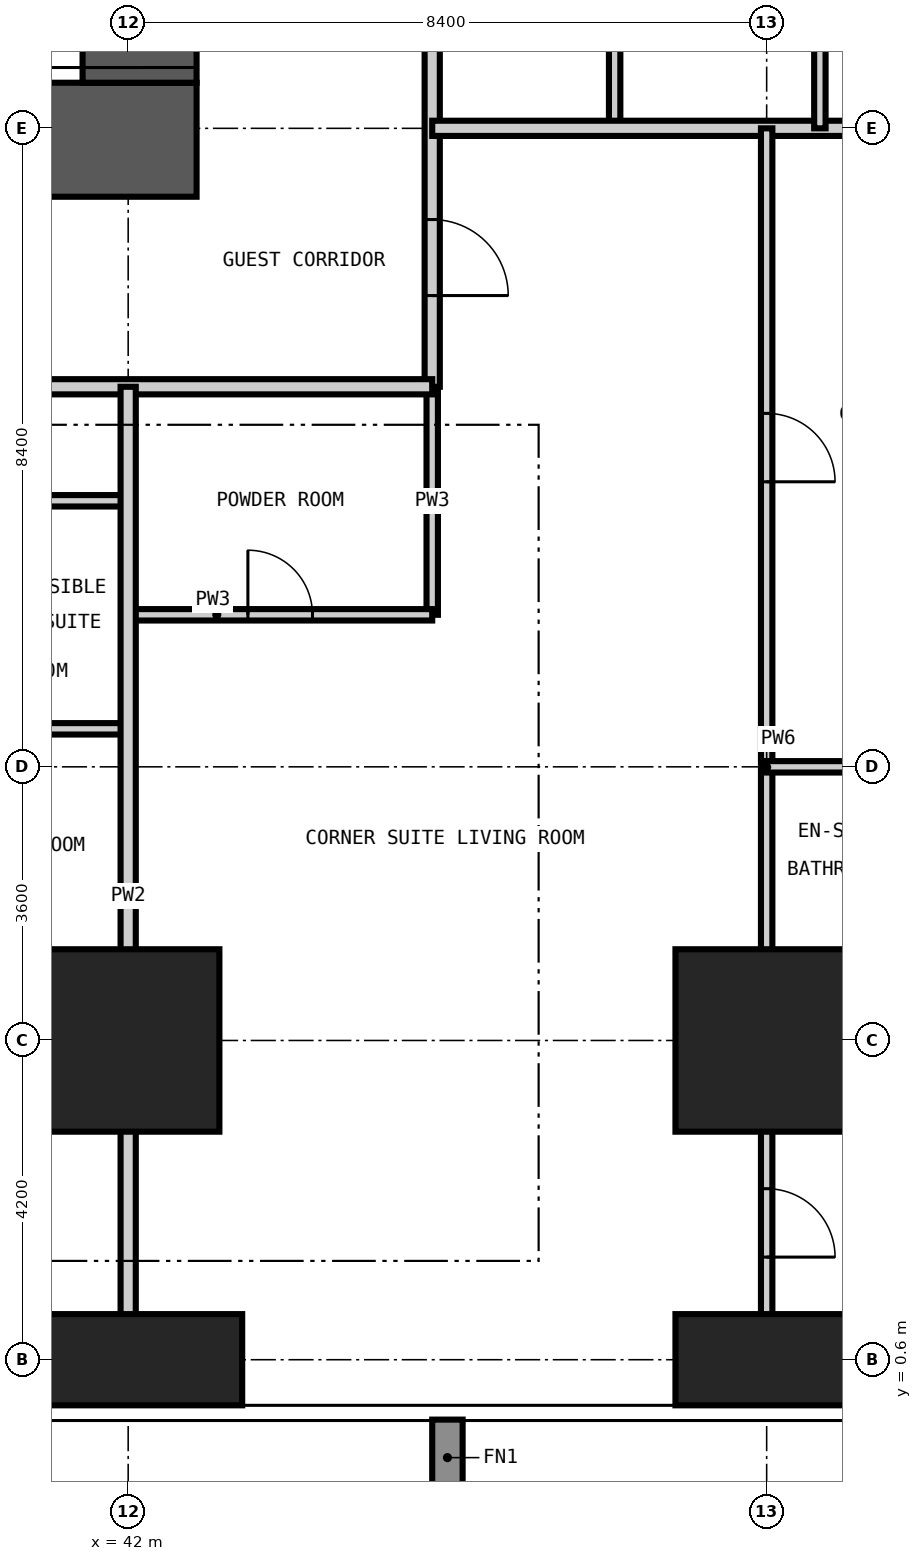
"""IFC4 building model, lengths in metres.
Left out: names, types, materials, properties, quantities, classifications, styles, units other than length and angle.
Written with IfcOpenShell. Run it as: python <this file> out.ifc"""

import sys

from ifc_helpers import new_model, si_unit, direction, frame, frame_2d, origin, origin_2d, place, context, subcontext, project, spatial, rectangle, extrude, element, fill, save


model = new_model("IFC4")
c1 = context("Model", 3, precision=1e-05, world=origin(), true_north=direction((0.0, 1.0)))
c2 = subcontext(c1, "Body", "Model", "MODEL_VIEW")
j1 = project(units=[si_unit("LENGTHUNIT", "METRE"), si_unit("PLANEANGLEUNIT", "RADIAN")], contexts=[c1])
p1 = place(None, origin())
s1 = spatial("IfcSite", under=j1, at=p1, CompositionType="ELEMENT")
p2 = place(p1, origin())
s2 = spatial("IfcBuilding", under=s1, at=p2, CompositionType="ELEMENT")
p3 = place(p2, frame((0.0, 0.0, 84.6)))
s3 = spatial("IfcBuildingStorey", under=s2, at=p3, CompositionType="ELEMENT", Elevation=84.6)
p4 = place(p3, frame((42.0, 0.6, -0.35), z_axis=(0.0, 0.0, 1.0), x_axis=(1.0, 0.0, 0.0)))
e1 = element("IfcColumn", 1, at=p4, inside=s3, PredefinedType="COLUMN", context=c2, shape_type="SweptSolid", body=[
    extrude(rectangle(XDim=3.0, YDim=1.2, at=origin_2d()), origin(), (0.0, 0.0, 1.0), 3.55),
])
p5 = place(p3, frame((42.0, 4.8, -0.35), z_axis=(0.0, 0.0, 1.0), x_axis=(1.0, 0.0, 0.0)))
e2 = element("IfcColumn", 2, at=p5, inside=s3, PredefinedType="COLUMN", context=c2, shape_type="SweptSolid", body=[
    extrude(rectangle(XDim=2.4, YDim=2.4, at=origin_2d()), origin(), (0.0, 0.0, 1.0), 3.55),
])
p6 = place(p3, frame((50.4, 0.6, -0.35), z_axis=(0.0, 0.0, 1.0), x_axis=(1.0, 0.0, 0.0)))
e3 = element("IfcColumn", 3, at=p6, inside=s3, PredefinedType="COLUMN", context=c2, shape_type="SweptSolid", body=[
    extrude(rectangle(XDim=2.4, YDim=1.2, at=origin_2d()), origin(), (0.0, 0.0, 1.0), 3.55),
])
p7 = place(p3, frame((50.4, 4.8, -0.35), z_axis=(0.0, 0.0, 1.0), x_axis=(1.0, 0.0, 0.0)))
e4 = element("IfcColumn", 4, at=p7, inside=s3, PredefinedType="COLUMN", context=c2, shape_type="SweptSolid", body=[
    extrude(rectangle(XDim=2.4, YDim=2.4, at=origin_2d()), origin(), (0.0, 0.0, 1.0), 3.55),
])
p8 = place(p3, frame((15.9, 16.65, -0.35), z_axis=(0.0, 0.0, 1.0), x_axis=(1.0, 0.0, 0.0)))
e5 = element("IfcWall", 5, at=p8, inside=s3, PredefinedType="SHEAR", context=c2, shape_type="SweptSolid", body=[
    extrude(rectangle(XDim=27.0, YDim=1.5, at=frame_2d((13.5, 0.0))), origin(), (0.0, 0.0, 1.0), 3.55),
])
p9 = place(p8, frame((13.0, 0.0, 0.35)))
e6 = element("IfcOpeningElement", 6, at=p9, cuts=e5, PredefinedType="OPENING", context=c2, shape_type="SweptSolid", body=[
    extrude(rectangle(XDim=1.0, YDim=2.1, at=frame_2d((0.5, 1.05))), frame((0.0, 0.76, 0.0), z_axis=(0.0, -1.0, 0.0), x_axis=(1.0, 0.0, 0.0)), (0.0, 0.0, 1.0), 1.52),
])
p10 = place(p8, frame((19.3, 0.0, 0.35)))
e7 = element("IfcOpeningElement", 7, at=p10, cuts=e5, PredefinedType="OPENING", context=c2, shape_type="SweptSolid", body=[
    extrude(rectangle(XDim=1.0, YDim=2.1, at=frame_2d((0.5, 1.05))), frame((0.0, 0.76, 0.0), z_axis=(0.0, -1.0, 0.0), x_axis=(1.0, 0.0, 0.0)), (0.0, 0.0, 1.0), 1.52),
])
p11 = place(p3, frame((42.15, 17.4, -0.35), z_axis=(0.0, 0.0, 1.0), x_axis=(0.0, 1.0, 0.0)))
e8 = element("IfcWall", 8, at=p11, inside=s3, PredefinedType="SHEAR", context=c2, shape_type="SweptSolid", body=[
    extrude(rectangle(XDim=24.0, YDim=1.5, at=frame_2d((12.0, 0.0))), origin(), (0.0, 0.0, 1.0), 3.55),
])
p12 = place(p11, frame((0.2, 0.0, 0.35)))
e9 = element("IfcOpeningElement", 9, at=p12, cuts=e8, PredefinedType="OPENING", context=c2, shape_type="SweptSolid", body=[
    extrude(rectangle(XDim=1.2, YDim=2.2, at=frame_2d((0.6, 1.1))), frame((0.0, 0.76, 0.0), z_axis=(0.0, -1.0, 0.0), x_axis=(1.0, 0.0, 0.0)), (0.0, 0.0, 1.0), 1.52),
])
p13 = place(p11, frame((11.5, 0.0, 0.35)))
e10 = element("IfcOpeningElement", 10, at=p13, cuts=e8, PredefinedType="OPENING", context=c2, shape_type="SweptSolid", body=[
    extrude(rectangle(XDim=1.0, YDim=2.1, at=frame_2d((0.5, 1.05))), frame((0.0, 0.76, 0.0), z_axis=(0.0, -1.0, 0.0), x_axis=(1.0, 0.0, 0.0)), (0.0, 0.0, 1.0), 1.52),
])
p14 = place(p11, frame((19.9, 0.0, 0.35)))
e11 = element("IfcOpeningElement", 11, at=p14, cuts=e8, PredefinedType="OPENING", context=c2, shape_type="SweptSolid", body=[
    extrude(rectangle(XDim=1.0, YDim=2.1, at=frame_2d((0.5, 1.05))), frame((0.0, 0.76, 0.0), z_axis=(0.0, -1.0, 0.0), x_axis=(1.0, 0.0, 0.0)), (0.0, 0.0, 1.0), 1.52),
])
p15 = place(p3, frame((46.0, 10.4, 0.0), z_axis=(0.0, 0.0, 1.0), x_axis=(0.0, 1.0, 0.0)))
e12 = element("IfcWall", 12, at=p15, inside=s3, PredefinedType="PARTITIONING", context=c2, shape_type="SweptSolid", body=[
    extrude(rectangle(XDim=3.0, YDim=0.15, at=frame_2d((1.5, 0.0))), origin(), (0.0, 0.0, 1.0), 3.2),
])
p16 = place(p3, frame((48.4, 16.8, 0.0), z_axis=(0.0, 0.0, 1.0), x_axis=(0.0, 1.0, 0.0)))
e13 = element("IfcWall", 13, at=p16, inside=s3, PredefinedType="PARTITIONING", context=c2, shape_type="SweptSolid", body=[
    extrude(rectangle(XDim=2.7, YDim=0.15, at=frame_2d((1.35, 0.0))), origin(), (0.0, 0.0, 1.0), 3.2),
])
p17 = place(p3, frame((50.4, 4.8, 0.0), z_axis=(0.0, 0.0, 1.0), x_axis=(1.0, 0.0, 0.0)))
e14 = element("IfcWall", 14, at=p17, inside=s3, PredefinedType="PARTITIONING", context=c2, shape_type="SweptSolid", body=[
    extrude(rectangle(XDim=3.0, YDim=0.15, at=frame_2d((1.5, 0.0))), origin(), (0.0, 0.0, 1.0), 3.2),
])
p18 = place(p3, frame((39.3, 8.9, 0.0), z_axis=(0.0, 0.0, 1.0), x_axis=(1.0, 0.0, 0.0)))
e15 = element("IfcWall", 15, at=p18, inside=s3, PredefinedType="PARTITIONING", context=c2, shape_type="SweptSolid", body=[
    extrude(rectangle(XDim=2.7, YDim=0.15, at=frame_2d((1.35, 0.0))), origin(), (0.0, 0.0, 1.0), 3.2),
])
p19 = place(p3, frame((42.0, 10.4, 0.0), z_axis=(0.0, 0.0, 1.0), x_axis=(1.0, 0.0, 0.0)))
e16 = element("IfcWall", 16, at=p19, inside=s3, PredefinedType="PARTITIONING", context=c2, shape_type="SweptSolid", body=[
    extrude(rectangle(XDim=4.0, YDim=0.15, at=frame_2d((2.0, 0.0))), origin(), (0.0, 0.0, 1.0), 3.2),
])
p20 = place(p19, frame((1.575, 0.0, 0.0)))
e17 = element("IfcOpeningElement", 17, at=p20, cuts=e16, PredefinedType="OPENING", context=c2, shape_type="SweptSolid", body=[
    extrude(rectangle(XDim=0.85, YDim=2.1, at=frame_2d((0.425, 1.05))), frame((0.0, 0.085, 0.0), z_axis=(0.0, -1.0, 0.0), x_axis=(1.0, 0.0, 0.0)), (0.0, 0.0, 1.0), 0.17),
])
p21 = place(p3, frame((39.3, 11.9, 0.0), z_axis=(0.0, 0.0, 1.0), x_axis=(1.0, 0.0, 0.0)))
e18 = element("IfcWall", 18, at=p21, inside=s3, PredefinedType="PARTITIONING", context=c2, shape_type="SweptSolid", body=[
    extrude(rectangle(XDim=2.7, YDim=0.15, at=frame_2d((1.35, 0.0))), origin(), (0.0, 0.0, 1.0), 3.2),
])
p22 = place(p3, frame((46.0, 44.8, 0.0), z_axis=(0.0, 0.0, 1.0), x_axis=(0.0, -1.0, 0.0)))
e19 = element("IfcWall", 19, at=p22, inside=s3, PredefinedType="PARTITIONING", context=c2, shape_type="SweptSolid", body=[
    extrude(rectangle(XDim=31.4, YDim=0.2, at=frame_2d((15.7, 0.0))), origin(), (0.0, 0.0, 1.0), 3.2),
])
p23 = place(p22, frame((21.2, 0.0, 0.0)))
e20 = element("IfcOpeningElement", 20, at=p23, cuts=e19, PredefinedType="OPENING", context=c2, shape_type="SweptSolid", body=[
    extrude(rectangle(XDim=1.0, YDim=2.2, at=frame_2d((0.5, 1.1))), frame((0.0, 0.11, 0.0), z_axis=(0.0, -1.0, 0.0), x_axis=(1.0, 0.0, 0.0)), (0.0, 0.0, 1.0), 0.22),
])
p24 = place(p22, frame((8.6, 0.0, 0.0)))
e21 = element("IfcOpeningElement", 21, at=p24, cuts=e19, PredefinedType="OPENING", context=c2, shape_type="SweptSolid", body=[
    extrude(rectangle(XDim=1.0, YDim=2.2, at=frame_2d((0.5, 1.1))), frame((0.0, 0.11, 0.0), z_axis=(0.0, -1.0, 0.0), x_axis=(1.0, 0.0, 0.0)), (0.0, 0.0, 1.0), 0.22),
])
p25 = place(p22, frame((29.2, 0.0, 0.0)))
e22 = element("IfcOpeningElement", 22, at=p25, cuts=e19, PredefinedType="OPENING", context=c2, shape_type="SweptSolid", body=[
    extrude(rectangle(XDim=1.0, YDim=2.2, at=frame_2d((0.5, 1.1))), frame((0.0, 0.11, 0.0), z_axis=(0.0, -1.0, 0.0), x_axis=(1.0, 0.0, 0.0)), (0.0, 0.0, 1.0), 0.22),
])
p26 = place(p22, frame((0.9, 0.0, 0.0)))
e23 = element("IfcOpeningElement", 23, at=p26, cuts=e19, PredefinedType="OPENING", context=c2, shape_type="SweptSolid", body=[
    extrude(rectangle(XDim=1.0, YDim=2.2, at=frame_2d((0.5, 1.1))), frame((0.0, 0.11, 0.0), z_axis=(0.0, -1.0, 0.0), x_axis=(1.0, 0.0, 0.0)), (0.0, 0.0, 1.0), 0.22),
])
p27 = place(p3, frame((46.0, 13.4, 0.0), z_axis=(0.0, 0.0, 1.0), x_axis=(-1.0, 0.0, 0.0)))
e24 = element("IfcWall", 24, at=p27, inside=s3, PredefinedType="PARTITIONING", context=c2, shape_type="SweptSolid", body=[
    extrude(rectangle(XDim=32.6, YDim=0.2, at=frame_2d((16.3, 0.0))), origin(), (0.0, 0.0, 1.0), 3.2),
])
p28 = place(p27, frame((26.6, 0.0, 0.0)))
e25 = element("IfcOpeningElement", 25, at=p28, cuts=e24, PredefinedType="OPENING", context=c2, shape_type="SweptSolid", body=[
    extrude(rectangle(XDim=1.0, YDim=2.2, at=frame_2d((0.5, 1.1))), frame((0.0, 0.11, 0.0), z_axis=(0.0, -1.0, 0.0), x_axis=(1.0, 0.0, 0.0)), (0.0, 0.0, 1.0), 0.22),
])
p29 = place(p27, frame((19.1, 0.0, 0.0)))
e26 = element("IfcOpeningElement", 26, at=p29, cuts=e24, PredefinedType="OPENING", context=c2, shape_type="SweptSolid", body=[
    extrude(rectangle(XDim=1.0, YDim=2.2, at=frame_2d((0.5, 1.1))), frame((0.0, 0.11, 0.0), z_axis=(0.0, -1.0, 0.0), x_axis=(1.0, 0.0, 0.0)), (0.0, 0.0, 1.0), 0.22),
])
p30 = place(p27, frame((13.1, 0.0, 0.0)))
e27 = element("IfcOpeningElement", 27, at=p30, cuts=e24, PredefinedType="OPENING", context=c2, shape_type="SweptSolid", body=[
    extrude(rectangle(XDim=1.0, YDim=2.2, at=frame_2d((0.5, 1.1))), frame((0.0, 0.11, 0.0), z_axis=(0.0, -1.0, 0.0), x_axis=(1.0, 0.0, 0.0)), (0.0, 0.0, 1.0), 0.22),
])
p31 = place(p27, frame((5.6, 0.0, 0.0)))
e28 = element("IfcOpeningElement", 28, at=p31, cuts=e24, PredefinedType="OPENING", context=c2, shape_type="SweptSolid", body=[
    extrude(rectangle(XDim=1.0, YDim=2.2, at=frame_2d((0.5, 1.1))), frame((0.0, 0.11, 0.0), z_axis=(0.0, -1.0, 0.0), x_axis=(1.0, 0.0, 0.0)), (0.0, 0.0, 1.0), 0.22),
])
p32 = place(p3, frame((42.0, -0.008, 0.0), z_axis=(0.0, 0.0, 1.0), x_axis=(0.0, 1.0, 0.0)))
e29 = element("IfcWall", 29, at=p32, inside=s3, PredefinedType="PARTITIONING", context=c2, shape_type="SweptSolid", body=[
    extrude(rectangle(XDim=13.408, YDim=0.2, at=frame_2d((6.704, 0.0))), origin(), (0.0, 0.0, 1.0), 3.2),
])
p33 = place(p3, frame((46.0, 16.8, 0.0), z_axis=(0.0, 0.0, 1.0), x_axis=(1.0, 0.0, 0.0)))
e30 = element("IfcWall", 30, at=p33, inside=s3, PredefinedType="PARTITIONING", context=c2, shape_type="SweptSolid", body=[
    extrude(rectangle(XDim=12.808, YDim=0.2, at=frame_2d((6.404, 0.0))), origin(), (0.0, 0.0, 1.0), 3.2),
])
p34 = place(p3, frame((50.4, -0.008, 0.0), z_axis=(0.0, 0.0, 1.0), x_axis=(0.0, 1.0, 0.0)))
e31 = element("IfcWall", 31, at=p34, inside=s3, PredefinedType="PARTITIONING", context=c2, shape_type="SweptSolid", body=[
    extrude(rectangle(XDim=16.808, YDim=0.15, at=frame_2d((8.404, 0.0))), origin(), (0.0, 0.0, 1.0), 3.2),
])
p35 = place(p34, frame((1.958, 0.0, 0.0)))
e32 = element("IfcOpeningElement", 32, at=p35, cuts=e31, PredefinedType="OPENING", context=c2, shape_type="SweptSolid", body=[
    extrude(rectangle(XDim=0.9, YDim=2.1, at=frame_2d((0.45, 1.05))), frame((0.0, 0.085, 0.0), z_axis=(0.0, -1.0, 0.0), x_axis=(1.0, 0.0, 0.0)), (0.0, 0.0, 1.0), 0.17),
])
p36 = place(p34, frame((12.158, 0.0, 0.0)))
e33 = element("IfcOpeningElement", 33, at=p36, cuts=e31, PredefinedType="OPENING", context=c2, shape_type="SweptSolid", body=[
    extrude(rectangle(XDim=0.9, YDim=2.1, at=frame_2d((0.45, 1.05))), frame((0.0, 0.085, 0.0), z_axis=(0.0, -1.0, 0.0), x_axis=(1.0, 0.0, 0.0)), (0.0, 0.0, 1.0), 0.17),
])
p37 = place(p3, frame((51.1, 16.8, 0.0), z_axis=(0.0, 0.0, 1.0), x_axis=(0.0, 1.0, 0.0)))
e34 = element("IfcWall", 34, at=p37, inside=s3, PredefinedType="PARTITIONING", context=c2, shape_type="SweptSolid", body=[
    extrude(rectangle(XDim=2.7, YDim=0.15, at=frame_2d((1.35, 0.0))), origin(), (0.0, 0.0, 1.0), 3.2),
])
p38 = place(p3, frame((50.4, 8.4, 0.0), z_axis=(0.0, 0.0, 1.0), x_axis=(1.0, 0.0, 0.0)))
e35 = element("IfcWall", 35, at=p38, inside=s3, PredefinedType="PARTITIONING", context=c2, shape_type="SweptSolid", body=[
    extrude(rectangle(XDim=8.408, YDim=0.15, at=frame_2d((4.204, 0.0))), origin(), (0.0, 0.0, 1.0), 3.2),
])
p39 = place(p38, frame((4.85, 0.0, 0.0)))
e36 = element("IfcOpeningElement", 36, at=p39, cuts=e35, PredefinedType="OPENING", context=c2, shape_type="SweptSolid", body=[
    extrude(rectangle(XDim=0.9, YDim=2.1, at=frame_2d((0.45, 1.05))), frame((0.0, 0.085, 0.0), z_axis=(0.0, -1.0, 0.0), x_axis=(1.0, 0.0, 0.0)), (0.0, 0.0, 1.0), 0.17),
])
p40 = place(p12, origin())
e37 = element("IfcDoor", 37, at=p40, inside=s3, OperationType="SINGLE_SWING_LEFT", PredefinedType="DOOR", context=c2, shape_type="SweptSolid", body=[
    extrude(rectangle(XDim=1.2, YDim=2.2, at=frame_2d((0.6, 1.1))), frame((0.0, 0.025, 0.0), z_axis=(0.0, -1.0, 0.0), x_axis=(1.0, 0.0, 0.0)), (0.0, 0.0, 1.0), 0.05),
])
fill(e9, e37)
p41 = place(p25, origin())
e38 = element("IfcDoor", 38, at=p41, inside=s3, OperationType="SINGLE_SWING_RIGHT", PredefinedType="DOOR", context=c2, shape_type="SweptSolid", body=[
    extrude(rectangle(XDim=1.0, YDim=2.2, at=frame_2d((0.5, 1.1))), frame((0.0, 0.025, 0.0), z_axis=(0.0, -1.0, 0.0), x_axis=(1.0, 0.0, 0.0)), (0.0, 0.0, 1.0), 0.05),
])
fill(e22, e38)
p42 = place(p20, origin())
e39 = element("IfcDoor", 39, at=p42, inside=s3, OperationType="SINGLE_SWING_LEFT", PredefinedType="DOOR", context=c2, shape_type="SweptSolid", body=[
    extrude(rectangle(XDim=0.85, YDim=2.1, at=frame_2d((0.425, 1.05))), frame((0.0, 0.025, 0.0), z_axis=(0.0, -1.0, 0.0), x_axis=(1.0, 0.0, 0.0)), (0.0, 0.0, 1.0), 0.05),
])
fill(e17, e39)
p43 = place(p35, frame((0.9, 0.0, 0.0), z_axis=(0.0, 0.0, 1.0), x_axis=(-1.0, 0.0, 0.0)))
e40 = element("IfcDoor", 40, at=p43, inside=s3, OperationType="SINGLE_SWING_RIGHT", PredefinedType="DOOR", context=c2, shape_type="SweptSolid", body=[
    extrude(rectangle(XDim=0.9, YDim=2.1, at=frame_2d((0.45, 1.05))), frame((0.0, 0.025, 0.0), z_axis=(0.0, -1.0, 0.0), x_axis=(1.0, 0.0, 0.0)), (0.0, 0.0, 1.0), 0.05),
])
fill(e32, e40)
p44 = place(p36, frame((0.9, 0.0, 0.0), z_axis=(0.0, 0.0, 1.0), x_axis=(-1.0, 0.0, 0.0)))
e41 = element("IfcDoor", 41, at=p44, inside=s3, OperationType="SINGLE_SWING_RIGHT", PredefinedType="DOOR", context=c2, shape_type="SweptSolid", body=[
    extrude(rectangle(XDim=0.9, YDim=2.1, at=frame_2d((0.45, 1.05))), frame((0.0, 0.025, 0.0), z_axis=(0.0, -1.0, 0.0), x_axis=(1.0, 0.0, 0.0)), (0.0, 0.0, 1.0), 0.05),
])
fill(e33, e41)
save(model, sys.argv[1])
